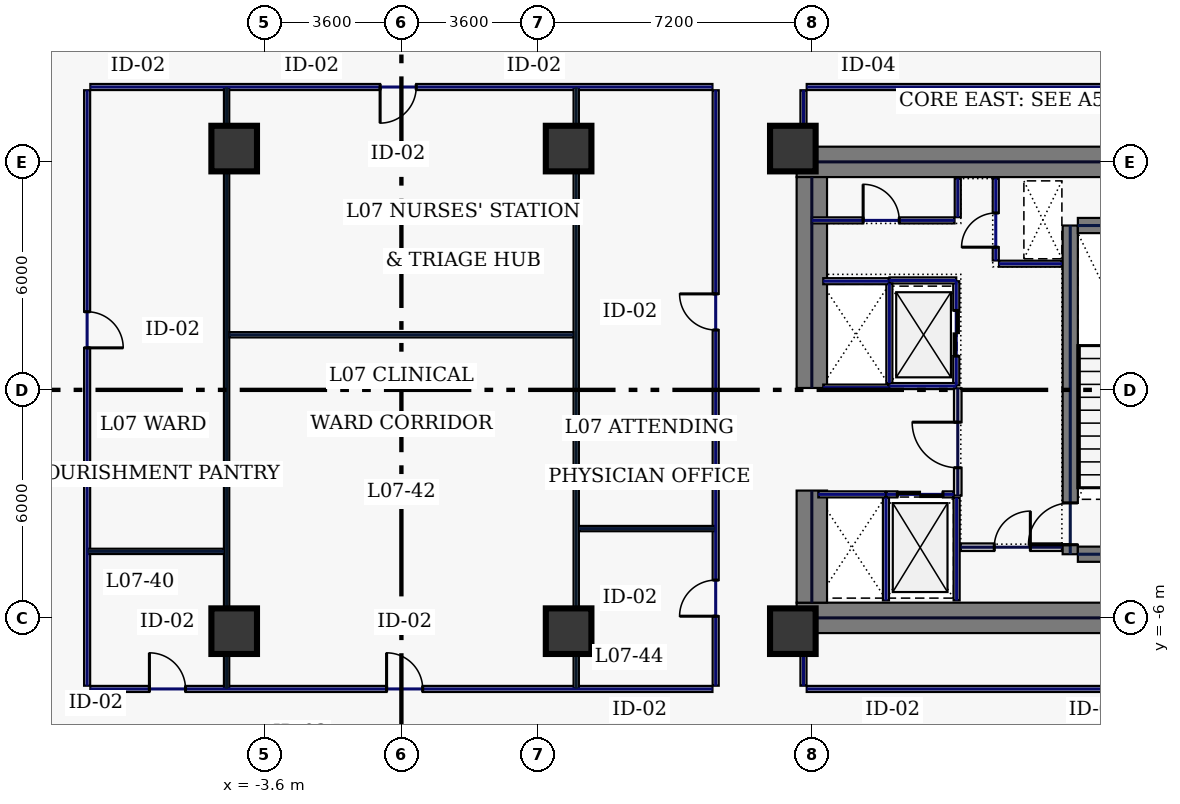
"""IFC4 building model, lengths in metres.
Left out: names, types, materials, properties, quantities, classifications, styles, units other than length and angle.
Written with IfcOpenShell. Run it as: python <this file> out.ifc"""

import sys

from ifc_helpers import new_model, si_unit, direction, frame, frame_2d, origin, origin_2d, place, context, subcontext, project, spatial, rectangle, hollow_rectangle, extrude, element, fill, save


model = new_model("IFC4")
c1 = context("Model", 3, precision=1e-05, world=origin(), true_north=direction((0.0, 1.0)))
c2 = subcontext(c1, "Body", "Model", "MODEL_VIEW")
j1 = project(units=[si_unit("LENGTHUNIT", "METRE"), si_unit("PLANEANGLEUNIT", "RADIAN")], contexts=[c1])
p1 = place(None, origin())
s1 = spatial("IfcSite", under=j1, at=p1, CompositionType="ELEMENT")
p2 = place(p1, origin())
s2 = spatial("IfcBuilding", under=s1, at=p2, CompositionType="ELEMENT")
p3 = place(p2, frame((0.0, 0.0, 39.4)))
s3 = spatial("IfcBuildingStorey", under=s2, at=p3, CompositionType="ELEMENT", Elevation=39.4)
for number, where, z_axis, x_axis in (
    (1, (10.4, 6.0, 0.0), (0.0, 0.0, 1.0), (1.0, 0.0, 0.0)),
    (2, (10.4, -6.0, 0.0), (0.0, 0.0, 1.0), (1.0, 0.0, 0.0)),
):
    element("IfcWall", number, at=place(p3, frame(where, z_axis=z_axis, x_axis=x_axis)), inside=s3, PredefinedType="SHEAR", context=c2, shape_type="SweptSolid", body=[
        extrude(rectangle(XDim=11.6, YDim=0.8, at=frame_2d((5.8, 0.0))), origin(), (0.0, 0.0, 1.0), 3.74),
    ])
p4 = place(p3, frame((10.8, -5.6, 0.0), z_axis=(0.0, 0.0, 1.0), x_axis=(0.0, 1.0, 0.0)))
e3 = element("IfcWall", 3, at=p4, inside=s3, PredefinedType="SHEAR", context=c2, shape_type="SweptSolid", body=[
    extrude(rectangle(XDim=2.95, YDim=0.8, at=frame_2d((1.475, 0.0))), origin(), (0.0, 0.0, 1.0), 3.74),
])
p5 = place(p3, frame((10.8, 0.05, 0.0), z_axis=(0.0, 0.0, 1.0), x_axis=(0.0, 1.0, 0.0)))
e4 = element("IfcWall", 4, at=p5, inside=s3, PredefinedType="SHEAR", context=c2, shape_type="SweptSolid", body=[
    extrude(rectangle(XDim=5.55, YDim=0.8, at=frame_2d((2.775, 0.0))), origin(), (0.0, 0.0, 1.0), 3.74),
])
p6 = place(p3, frame((17.6, -4.325, 0.0), z_axis=(0.0, 0.0, 1.0), x_axis=(0.0, 1.0, 0.0)))
e5 = element("IfcWall", 5, at=p6, inside=s3, PredefinedType="SHEAR", context=c2, shape_type="SweptSolid", body=[
    extrude(rectangle(XDim=8.65, YDim=0.4, at=frame_2d((4.325, 0.0))), origin(), (0.0, 0.0, 1.0), 3.74),
])
p7 = place(p6, frame((0.25, 0.0, 0.0)))
e6 = element("IfcOpeningElement", 6, at=p7, cuts=e5, PredefinedType="OPENING", context=c2, shape_type="SweptSolid", body=[
    extrude(rectangle(XDim=1.1, YDim=2.2, at=frame_2d((0.55, 1.1))), frame((0.0, 0.21, 0.0), z_axis=(0.0, -1.0, 0.0), x_axis=(1.0, 0.0, 0.0)), (0.0, 0.0, 1.0), 0.42),
])
for number, where, z_axis, x_axis in (
    (7, (17.8, -4.325, 0.0), (0.0, 0.0, 1.0), (1.0, 0.0, 0.0)),
    (8, (17.8, 4.325, 0.0), (0.0, 0.0, 1.0), (1.0, 0.0, 0.0)),
):
    element("IfcWall", number, at=place(p3, frame(where, z_axis=z_axis, x_axis=x_axis)), inside=s3, PredefinedType="SHEAR", context=c2, shape_type="SweptSolid", body=[
        extrude(rectangle(XDim=3.4, YDim=0.4, at=frame_2d((1.7, 0.0))), origin(), (0.0, 0.0, 1.0), 3.74),
    ])
for number, where, z_axis, x_axis in (
    (9, (10.3, -6.35, 0.0), (0.0, 0.0, 1.0), (1.0, 0.0, 0.0)),
    (10, (10.3, 6.35, 0.0), (0.0, 0.0, 1.0), (1.0, 0.0, 0.0)),
    (11, (-4.4, -6.35, 0.0), (0.0, 0.0, 1.0), (1.0, 0.0, 0.0)),
    (12, (4.4, -6.35, 0.0), (0.0, 0.0, 1.0), (1.0, 0.0, 0.0)),
    (13, (-4.4, 6.35, 0.0), (0.0, 0.0, 1.0), (1.0, 0.0, 0.0)),
    (14, (4.4, 6.35, 0.0), (0.0, 0.0, 1.0), (1.0, 0.0, 0.0)),
):
    element("IfcColumn", number, at=place(p3, frame(where, z_axis=z_axis, x_axis=x_axis)), inside=s3, PredefinedType="COLUMN", context=c2, shape_type="SweptSolid", body=[
        extrude(hollow_rectangle(XDim=1.2, YDim=1.2, WallThickness=0.05, at=origin_2d()), origin(), (0.0, 0.0, 1.0), 3.74),
    ])
p8 = place(p3, frame((14.6, 0.12, 0.0), z_axis=(0.0, 0.0, 1.0), x_axis=(0.0, 1.0, 0.0)))
e15 = element("IfcWall", 15, at=p8, inside=s3, PredefinedType="PARTITIONING", context=c2, shape_type="SweptSolid", body=[
    extrude(rectangle(XDim=2.74, YDim=0.16, at=frame_2d((1.37, 0.0))), origin(), (0.0, 0.0, 1.0), 3.74),
])
p9 = place(p8, frame((0.77, 0.0, 0.0)))
e16 = element("IfcOpeningElement", 16, at=p9, cuts=e15, PredefinedType="OPENING", context=c2, shape_type="SweptSolid", body=[
    extrude(rectangle(XDim=1.2, YDim=2.2, at=frame_2d((0.6, 1.1))), frame((0.0, 0.09, 0.0), z_axis=(0.0, -1.0, 0.0), x_axis=(1.0, 0.0, 0.0)), (0.0, 0.0, 1.0), 0.18),
])
for number, where, z_axis, x_axis in (
    (17, (12.84, 0.1, 0.0), (0.0, 0.0, 1.0), (1.0, 0.0, 0.0)),
    (18, (12.84, 2.88, 0.0), (0.0, 0.0, 1.0), (1.0, 0.0, 0.0)),
):
    element("IfcWall", number, at=place(p3, frame(where, z_axis=z_axis, x_axis=x_axis)), inside=s3, PredefinedType="PARTITIONING", context=c2, shape_type="SweptSolid", body=[
        extrude(rectangle(XDim=1.76, YDim=0.16, at=frame_2d((0.88, 0.0))), origin(), (0.0, 0.0, 1.0), 3.74),
    ])
p10 = place(p3, frame((12.84, 0.18, 0.0), z_axis=(0.0, 0.0, 1.0), x_axis=(0.0, 1.0, 0.0)))
e19 = element("IfcWall", 19, at=p10, inside=s3, PredefinedType="PARTITIONING", context=c2, shape_type="SweptSolid", body=[
    extrude(rectangle(XDim=2.62, YDim=0.16, at=frame_2d((1.31, 0.0))), origin(), (0.0, 0.0, 1.0), 3.74),
])
p11 = place(p3, frame((12.77, -2.75, 0.0), z_axis=(0.0, 0.0, 1.0), x_axis=(1.0, 0.0, 0.0)))
e20 = element("IfcWall", 20, at=p11, inside=s3, PredefinedType="PARTITIONING", context=c2, shape_type="SweptSolid", body=[
    extrude(rectangle(XDim=1.76, YDim=0.16, at=frame_2d((0.88, 0.0))), origin(), (0.0, 0.0, 1.0), 3.74),
])
p12 = place(p11, frame((0.28, 0.0, 0.0)))
e21 = element("IfcOpeningElement", 21, at=p12, cuts=e20, PredefinedType="OPENING", context=c2, shape_type="SweptSolid", body=[
    extrude(rectangle(XDim=1.2, YDim=2.2, at=frame_2d((0.6, 1.1))), frame((0.0, 0.09, 0.0), z_axis=(0.0, -1.0, 0.0), x_axis=(1.0, 0.0, 0.0)), (0.0, 0.0, 1.0), 0.18),
])
for number, where, z_axis, x_axis in (
    (22, (12.75, -5.54, 0.0), (0.0, 0.0, 1.0), (0.0, 1.0, 0.0)),
    (23, (14.61, -5.54, 0.0), (0.0, 0.0, 1.0), (0.0, 1.0, 0.0)),
):
    element("IfcWall", number, at=place(p3, frame(where, z_axis=z_axis, x_axis=x_axis)), inside=s3, PredefinedType="PARTITIONING", context=c2, shape_type="SweptSolid", body=[
        extrude(rectangle(XDim=2.7, YDim=0.16, at=frame_2d((1.35, 0.0))), origin(), (0.0, 0.0, 1.0), 3.74),
    ])
p13 = place(p3, frame((10.97, -2.75, 0.0), z_axis=(0.0, 0.0, 1.0), x_axis=(1.0, 0.0, 0.0)))
e24 = element("IfcWall", 24, at=p13, inside=s3, PredefinedType="PARTITIONING", context=c2, shape_type="SweptSolid", body=[
    extrude(rectangle(XDim=1.76, YDim=0.16, at=frame_2d((0.88, 0.0))), origin(), (0.0, 0.0, 1.0), 3.74),
])
for number, where, z_axis, x_axis in (
    (25, (11.1, 0.06, 0.0), (0.0, 0.0, 1.0), (1.0, 0.0, 0.0)),
    (26, (11.1, 2.86, 0.0), (0.0, 0.0, 1.0), (1.0, 0.0, 0.0)),
):
    element("IfcWall", number, at=place(p3, frame(where, z_axis=z_axis, x_axis=x_axis)), inside=s3, PredefinedType="PARTITIONING", context=c2, shape_type="SweptSolid", body=[
        extrude(rectangle(XDim=1.72, YDim=0.16, at=frame_2d((0.86, 0.0))), origin(), (0.0, 0.0, 1.0), 3.74),
    ])
p14 = place(p3, frame((15.64, 3.405, 0.0), z_axis=(0.0, 0.0, 1.0), x_axis=(0.0, 1.0, 0.0)))
e27 = element("IfcWall", 27, at=p14, inside=s3, PredefinedType="PARTITIONING", context=c2, shape_type="SweptSolid", body=[
    extrude(rectangle(XDim=2.155, YDim=0.16, at=frame_2d((1.078, 0.0))), origin(), (0.0, 0.0, 1.0), 3.74),
])
p15 = place(p14, frame((0.35, 0.0, 0.0)))
e28 = element("IfcOpeningElement", 28, at=p15, cuts=e27, PredefinedType="OPENING", context=c2, shape_type="SweptSolid", body=[
    extrude(rectangle(XDim=0.9, YDim=2.2, at=frame_2d((0.45, 1.1))), frame((0.0, 0.09, 0.0), z_axis=(0.0, -1.0, 0.0), x_axis=(1.0, 0.0, 0.0)), (0.0, 0.0, 1.0), 0.18),
])
p16 = place(p3, frame((15.725, 3.32, 0.0), z_axis=(0.0, 0.0, 1.0), x_axis=(1.0, 0.0, 0.0)))
e29 = element("IfcWall", 29, at=p16, inside=s3, PredefinedType="PARTITIONING", context=c2, shape_type="SweptSolid", body=[
    extrude(rectangle(XDim=1.655, YDim=0.16, at=frame_2d((0.827, 0.0))), origin(), (0.0, 0.0, 1.0), 3.74),
])
p17 = place(p3, frame((14.72, -4.14, 0.0), z_axis=(0.0, 0.0, 1.0), x_axis=(1.0, 0.0, 0.0)))
e30 = element("IfcWall", 30, at=p17, inside=s3, PredefinedType="SOLIDWALL", context=c2, shape_type="SweptSolid", body=[
    extrude(rectangle(XDim=2.66, YDim=0.2, at=frame_2d((1.33, 0.0))), origin(), (0.0, 0.0, 1.0), 3.74),
])
p18 = place(p17, frame((0.88, 0.0, 0.0)))
e31 = element("IfcOpeningElement", 31, at=p18, cuts=e30, PredefinedType="OPENING", context=c2, shape_type="SweptSolid", body=[
    extrude(rectangle(XDim=0.95, YDim=2.2, at=frame_2d((0.475, 1.1))), frame((0.0, 0.11, 0.0), z_axis=(0.0, -1.0, 0.0), x_axis=(1.0, 0.0, 0.0)), (0.0, 0.0, 1.0), 0.22),
])
p19 = place(p3, frame((10.8, 4.46, 0.0), z_axis=(0.0, 0.0, 1.0), x_axis=(1.0, 0.0, 0.0)))
e32 = element("IfcWall", 32, at=p19, inside=s3, PredefinedType="PARTITIONING", context=c2, shape_type="SweptSolid", body=[
    extrude(rectangle(XDim=3.755, YDim=0.16, at=frame_2d((1.877, 0.0))), origin(), (0.0, 0.0, 1.0), 3.74),
])
p20 = place(p19, frame((1.35, 0.0, 0.0)))
e33 = element("IfcOpeningElement", 33, at=p20, cuts=e32, PredefinedType="OPENING", context=c2, shape_type="SweptSolid", body=[
    extrude(rectangle(XDim=0.95, YDim=2.2, at=frame_2d((0.475, 1.1))), frame((0.0, 0.09, 0.0), z_axis=(0.0, -1.0, 0.0), x_axis=(1.0, 0.0, 0.0)), (0.0, 0.0, 1.0), 0.18),
])
p21 = place(p3, frame((14.64, 4.545, 0.0), z_axis=(0.0, 0.0, 1.0), x_axis=(0.0, 1.0, 0.0)))
e34 = element("IfcWall", 34, at=p21, inside=s3, PredefinedType="PARTITIONING", context=c2, shape_type="SweptSolid", body=[
    extrude(rectangle(XDim=1.015, YDim=0.16, at=frame_2d((0.508, 0.0))), origin(), (0.0, 0.0, 1.0), 3.74),
])
p22 = place(p3, frame((14.64, -2.78, 0.0), z_axis=(0.0, 0.0, 1.0), x_axis=(0.0, 1.0, 0.0)))
e35 = element("IfcWall", 35, at=p22, inside=s3, PredefinedType="SOLIDWALL", context=c2, shape_type="SweptSolid", body=[
    extrude(rectangle(XDim=2.82, YDim=0.2, at=frame_2d((1.41, 0.0))), origin(), (0.0, 0.0, 1.0), 3.74),
])
p23 = place(p22, frame((0.73, 0.0, 0.0)))
e36 = element("IfcOpeningElement", 36, at=p23, cuts=e35, PredefinedType="OPENING", context=c2, shape_type="SweptSolid", body=[
    extrude(rectangle(XDim=1.2, YDim=2.2, at=frame_2d((0.6, 1.1))), frame((0.0, 0.11, 0.0), z_axis=(0.0, -1.0, 0.0), x_axis=(1.0, 0.0, 0.0)), (0.0, 0.0, 1.0), 0.22),
])
p24 = place(p3, frame((27.185, 7.97, 0.0), z_axis=(0.0, 0.0, 1.0), x_axis=(-1.0, 0.0, 0.0)))
e37 = element("IfcWall", 37, at=p24, inside=s3, PredefinedType="PARTITIONING", context=c2, shape_type="SweptSolid", body=[
    extrude(rectangle(XDim=16.52, YDim=0.16, at=frame_2d((8.26, 0.0))), origin(), (0.0, 0.0, 1.0), 3.74),
])
p25 = place(p3, frame((10.58, 7.885, 0.0), z_axis=(0.0, 0.0, 1.0), x_axis=(0.0, -1.0, 0.0)))
e38 = element("IfcWall", 38, at=p25, inside=s3, PredefinedType="PARTITIONING", context=c2, shape_type="SweptSolid", body=[
    extrude(rectangle(XDim=1.465, YDim=0.16, at=frame_2d((0.732, 0.0))), origin(), (0.0, 0.0, 1.0), 3.74),
])
p26 = place(p3, frame((10.58, -6.42, 0.0), z_axis=(0.0, 0.0, 1.0), x_axis=(0.0, -1.0, 0.0)))
e39 = element("IfcWall", 39, at=p26, inside=s3, PredefinedType="PARTITIONING", context=c2, shape_type="SweptSolid", body=[
    extrude(rectangle(XDim=1.365, YDim=0.16, at=frame_2d((0.683, 0.0))), origin(), (0.0, 0.0, 1.0), 3.74),
])
p27 = place(p3, frame((10.665, -7.87, 0.0), z_axis=(0.0, 0.0, 1.0), x_axis=(1.0, 0.0, 0.0)))
e40 = element("IfcWall", 40, at=p27, inside=s3, PredefinedType="PARTITIONING", context=c2, shape_type="SweptSolid", body=[
    extrude(rectangle(XDim=16.52, YDim=0.16, at=frame_2d((8.26, 0.0))), origin(), (0.0, 0.0, 1.0), 3.74),
])
p28 = place(p3, frame((8.27, -7.785, 0.0), z_axis=(0.0, 0.0, 1.0), x_axis=(0.0, 1.0, 0.0)))
e41 = element("IfcWall", 41, at=p28, inside=s3, PredefinedType="PARTITIONING", context=c2, shape_type="SweptSolid", body=[
    extrude(rectangle(XDim=15.67, YDim=0.16, at=frame_2d((7.835, 0.0))), origin(), (0.0, 0.0, 1.0), 3.74),
])
p29 = place(p28, frame((1.829, 0.0, 0.0)))
e42 = element("IfcOpeningElement", 42, at=p29, cuts=e41, PredefinedType="OPENING", context=c2, shape_type="SweptSolid", body=[
    extrude(rectangle(XDim=0.95, YDim=2.2, at=frame_2d((0.475, 1.1))), frame((0.0, 0.09, 0.0), z_axis=(0.0, -1.0, 0.0), x_axis=(1.0, 0.0, 0.0)), (0.0, 0.0, 1.0), 0.18),
])
p30 = place(p28, frame((9.361, 0.0, 0.0)))
e43 = element("IfcOpeningElement", 43, at=p30, cuts=e41, PredefinedType="OPENING", context=c2, shape_type="SweptSolid", body=[
    extrude(rectangle(XDim=0.95, YDim=2.2, at=frame_2d((0.475, 1.1))), frame((0.0, 0.09, 0.0), z_axis=(0.0, -1.0, 0.0), x_axis=(1.0, 0.0, 0.0)), (0.0, 0.0, 1.0), 0.18),
])
p31 = place(p3, frame((8.185, 7.97, 0.0), z_axis=(0.0, 0.0, 1.0), x_axis=(-1.0, 0.0, 0.0)))
e44 = element("IfcWall", 44, at=p31, inside=s3, PredefinedType="PARTITIONING", context=c2, shape_type="SweptSolid", body=[
    extrude(rectangle(XDim=16.37, YDim=0.16, at=frame_2d((8.185, 0.0))), origin(), (0.0, 0.0, 1.0), 3.74),
])
p32 = place(p31, frame((7.795, 0.0, 0.0)))
e45 = element("IfcOpeningElement", 45, at=p32, cuts=e44, PredefinedType="OPENING", context=c2, shape_type="SweptSolid", body=[
    extrude(rectangle(XDim=0.95, YDim=2.2, at=frame_2d((0.475, 1.1))), frame((0.0, 0.09, 0.0), z_axis=(0.0, -1.0, 0.0), x_axis=(1.0, 0.0, 0.0)), (0.0, 0.0, 1.0), 0.18),
])
p33 = place(p3, frame((-8.27, 7.885, 0.0), z_axis=(0.0, 0.0, 1.0), x_axis=(0.0, -1.0, 0.0)))
e46 = element("IfcWall", 46, at=p33, inside=s3, PredefinedType="PARTITIONING", context=c2, shape_type="SweptSolid", body=[
    extrude(rectangle(XDim=15.67, YDim=0.16, at=frame_2d((7.835, 0.0))), origin(), (0.0, 0.0, 1.0), 3.74),
])
p34 = place(p33, frame((5.829, 0.0, 0.0)))
e47 = element("IfcOpeningElement", 47, at=p34, cuts=e46, PredefinedType="OPENING", context=c2, shape_type="SweptSolid", body=[
    extrude(rectangle(XDim=0.95, YDim=2.2, at=frame_2d((0.475, 1.1))), frame((0.0, 0.09, 0.0), z_axis=(0.0, -1.0, 0.0), x_axis=(1.0, 0.0, 0.0)), (0.0, 0.0, 1.0), 0.18),
])
p35 = place(p3, frame((-8.185, -7.87, 0.0), z_axis=(0.0, 0.0, 1.0), x_axis=(1.0, 0.0, 0.0)))
e48 = element("IfcWall", 48, at=p35, inside=s3, PredefinedType="PARTITIONING", context=c2, shape_type="SweptSolid", body=[
    extrude(rectangle(XDim=16.37, YDim=0.16, at=frame_2d((8.185, 0.0))), origin(), (0.0, 0.0, 1.0), 3.74),
])
p36 = place(p35, frame((1.554, 0.0, 0.0)))
e49 = element("IfcOpeningElement", 49, at=p36, cuts=e48, PredefinedType="OPENING", context=c2, shape_type="SweptSolid", body=[
    extrude(rectangle(XDim=0.95, YDim=2.2, at=frame_2d((0.475, 1.1))), frame((0.0, 0.09, 0.0), z_axis=(0.0, -1.0, 0.0), x_axis=(1.0, 0.0, 0.0)), (0.0, 0.0, 1.0), 0.18),
])
p37 = place(p35, frame((7.795, 0.0, 0.0)))
e50 = element("IfcOpeningElement", 50, at=p37, cuts=e48, PredefinedType="OPENING", context=c2, shape_type="SweptSolid", body=[
    extrude(rectangle(XDim=0.95, YDim=2.2, at=frame_2d((0.475, 1.1))), frame((0.0, 0.09, 0.0), z_axis=(0.0, -1.0, 0.0), x_axis=(1.0, 0.0, 0.0)), (0.0, 0.0, 1.0), 0.18),
])
for number, where, z_axis, x_axis in (
    (51, (-4.6, -7.865, 0.0), (0.0, 0.0, 1.0), (0.0, 1.0, 0.0)),
    (52, (4.6, -7.865, 0.0), (0.0, 0.0, 1.0), (0.0, 1.0, 0.0)),
):
    element("IfcWall", number, at=place(p3, frame(where, z_axis=z_axis, x_axis=x_axis)), inside=s3, PredefinedType="PARTITIONING", context=c2, shape_type="SweptSolid", body=[
        extrude(rectangle(XDim=15.83, YDim=0.14, at=frame_2d((7.915, 0.0))), origin(), (0.0, 0.0, 1.0), 2.935),
    ])
p38 = place(p3, frame((-4.525, 1.45, 0.0), z_axis=(0.0, 0.0, 1.0), x_axis=(1.0, 0.0, 0.0)))
e53 = element("IfcWall", 53, at=p38, inside=s3, PredefinedType="PARTITIONING", context=c2, shape_type="SweptSolid", body=[
    extrude(rectangle(XDim=9.05, YDim=0.14, at=frame_2d((4.525, 0.0))), origin(), (0.0, 0.0, 1.0), 3.74),
])
for number, where, z_axis, x_axis in (
    (54, (-8.265, -4.25, 0.0), (0.0, 0.0, 1.0), (1.0, 0.0, 0.0)),
    (55, (4.675, -3.65, 0.0), (0.0, 0.0, 1.0), (1.0, 0.0, 0.0)),
):
    element("IfcWall", number, at=place(p3, frame(where, z_axis=z_axis, x_axis=x_axis)), inside=s3, PredefinedType="PARTITIONING", context=c2, shape_type="SweptSolid", body=[
        extrude(rectangle(XDim=3.59, YDim=0.14, at=frame_2d((1.795, 0.0))), origin(), (0.0, 0.0, 1.0), 3.74),
    ])
p39 = place(p7, origin())
e56 = element("IfcDoor", 56, at=p39, inside=s3, OperationType="SINGLE_SWING_LEFT", PredefinedType="DOOR", context=c2, shape_type="SweptSolid", body=[
    extrude(rectangle(XDim=1.1, YDim=2.2, at=frame_2d((0.55, 1.1))), frame((0.0, 0.025, 0.0), z_axis=(0.0, -1.0, 0.0), x_axis=(1.0, 0.0, 0.0)), (0.0, 0.0, 1.0), 0.05),
])
fill(e6, e56)
p40 = place(p9, origin())
e57 = element("IfcDoor", 57, at=p40, inside=s3, OperationType="SLIDING_TO_LEFT", PredefinedType="DOOR", context=c2, shape_type="SweptSolid", body=[
    extrude(rectangle(XDim=1.2, YDim=2.2, at=frame_2d((0.6, 1.1))), frame((0.0, 0.025, 0.0), z_axis=(0.0, -1.0, 0.0), x_axis=(1.0, 0.0, 0.0)), (0.0, 0.0, 1.0), 0.05),
])
fill(e16, e57)
p41 = place(p12, origin())
e58 = element("IfcDoor", 58, at=p41, inside=s3, OperationType="SLIDING_TO_LEFT", PredefinedType="DOOR", context=c2, shape_type="SweptSolid", body=[
    extrude(rectangle(XDim=1.2, YDim=2.2, at=frame_2d((0.6, 1.1))), frame((0.0, 0.025, 0.0), z_axis=(0.0, -1.0, 0.0), x_axis=(1.0, 0.0, 0.0)), (0.0, 0.0, 1.0), 0.05),
])
fill(e21, e58)
p42 = place(p15, origin())
e59 = element("IfcDoor", 59, at=p42, inside=s3, OperationType="SINGLE_SWING_LEFT", PredefinedType="DOOR", context=c2, shape_type="SweptSolid", body=[
    extrude(rectangle(XDim=0.9, YDim=2.2, at=frame_2d((0.45, 1.1))), frame((0.0, 0.025, 0.0), z_axis=(0.0, -1.0, 0.0), x_axis=(1.0, 0.0, 0.0)), (0.0, 0.0, 1.0), 0.05),
])
fill(e28, e59)
p43 = place(p18, origin())
e60 = element("IfcDoor", 60, at=p43, inside=s3, OperationType="SINGLE_SWING_RIGHT", PredefinedType="DOOR", context=c2, shape_type="SweptSolid", body=[
    extrude(rectangle(XDim=0.95, YDim=2.2, at=frame_2d((0.475, 1.1))), frame((0.0, 0.025, 0.0), z_axis=(0.0, -1.0, 0.0), x_axis=(1.0, 0.0, 0.0)), (0.0, 0.0, 1.0), 0.05),
])
fill(e31, e60)
p44 = place(p20, origin())
e61 = element("IfcDoor", 61, at=p44, inside=s3, OperationType="SINGLE_SWING_LEFT", PredefinedType="DOOR", context=c2, shape_type="SweptSolid", body=[
    extrude(rectangle(XDim=0.95, YDim=2.2, at=frame_2d((0.475, 1.1))), frame((0.0, 0.025, 0.0), z_axis=(0.0, -1.0, 0.0), x_axis=(1.0, 0.0, 0.0)), (0.0, 0.0, 1.0), 0.05),
])
fill(e33, e61)
p45 = place(p23, origin())
e62 = element("IfcDoor", 62, at=p45, inside=s3, OperationType="SINGLE_SWING_RIGHT", PredefinedType="DOOR", context=c2, shape_type="SweptSolid", body=[
    extrude(rectangle(XDim=1.2, YDim=2.2, at=frame_2d((0.6, 1.1))), frame((0.0, 0.025, 0.0), z_axis=(0.0, -1.0, 0.0), x_axis=(1.0, 0.0, 0.0)), (0.0, 0.0, 1.0), 0.05),
])
fill(e36, e62)
p46 = place(p36, origin())
e63 = element("IfcDoor", 63, at=p46, inside=s3, OperationType="SINGLE_SWING_LEFT", PredefinedType="DOOR", context=c2, shape_type="SweptSolid", body=[
    extrude(rectangle(XDim=0.95, YDim=2.2, at=frame_2d((0.475, 1.1))), frame((0.0, 0.025, 0.0), z_axis=(0.0, -1.0, 0.0), x_axis=(1.0, 0.0, 0.0)), (0.0, 0.0, 1.0), 0.05),
])
fill(e49, e63)
p47 = place(p34, origin())
e64 = element("IfcDoor", 64, at=p47, inside=s3, OperationType="SINGLE_SWING_RIGHT", PredefinedType="DOOR", context=c2, shape_type="SweptSolid", body=[
    extrude(rectangle(XDim=0.95, YDim=2.2, at=frame_2d((0.475, 1.1))), frame((0.0, 0.025, 0.0), z_axis=(0.0, -1.0, 0.0), x_axis=(1.0, 0.0, 0.0)), (0.0, 0.0, 1.0), 0.05),
])
fill(e47, e64)
p48 = place(p37, origin())
e65 = element("IfcDoor", 65, at=p48, inside=s3, OperationType="SINGLE_SWING_LEFT", PredefinedType="DOOR", context=c2, shape_type="SweptSolid", body=[
    extrude(rectangle(XDim=0.95, YDim=2.2, at=frame_2d((0.475, 1.1))), frame((0.0, 0.025, 0.0), z_axis=(0.0, -1.0, 0.0), x_axis=(1.0, 0.0, 0.0)), (0.0, 0.0, 1.0), 0.05),
])
fill(e50, e65)
p49 = place(p32, origin())
e66 = element("IfcDoor", 66, at=p49, inside=s3, OperationType="SINGLE_SWING_RIGHT", PredefinedType="DOOR", context=c2, shape_type="SweptSolid", body=[
    extrude(rectangle(XDim=0.95, YDim=2.2, at=frame_2d((0.475, 1.1))), frame((0.0, 0.025, 0.0), z_axis=(0.0, -1.0, 0.0), x_axis=(1.0, 0.0, 0.0)), (0.0, 0.0, 1.0), 0.05),
])
fill(e45, e66)
p50 = place(p29, origin())
e67 = element("IfcDoor", 67, at=p50, inside=s3, OperationType="SINGLE_SWING_LEFT", PredefinedType="DOOR", context=c2, shape_type="SweptSolid", body=[
    extrude(rectangle(XDim=0.95, YDim=2.2, at=frame_2d((0.475, 1.1))), frame((0.0, 0.025, 0.0), z_axis=(0.0, -1.0, 0.0), x_axis=(1.0, 0.0, 0.0)), (0.0, 0.0, 1.0), 0.05),
])
fill(e42, e67)
p51 = place(p30, origin())
e68 = element("IfcDoor", 68, at=p51, inside=s3, OperationType="SINGLE_SWING_RIGHT", PredefinedType="DOOR", context=c2, shape_type="SweptSolid", body=[
    extrude(rectangle(XDim=0.95, YDim=2.2, at=frame_2d((0.475, 1.1))), frame((0.0, 0.025, 0.0), z_axis=(0.0, -1.0, 0.0), x_axis=(1.0, 0.0, 0.0)), (0.0, 0.0, 1.0), 0.05),
])
fill(e43, e68)
save(model, sys.argv[1])
